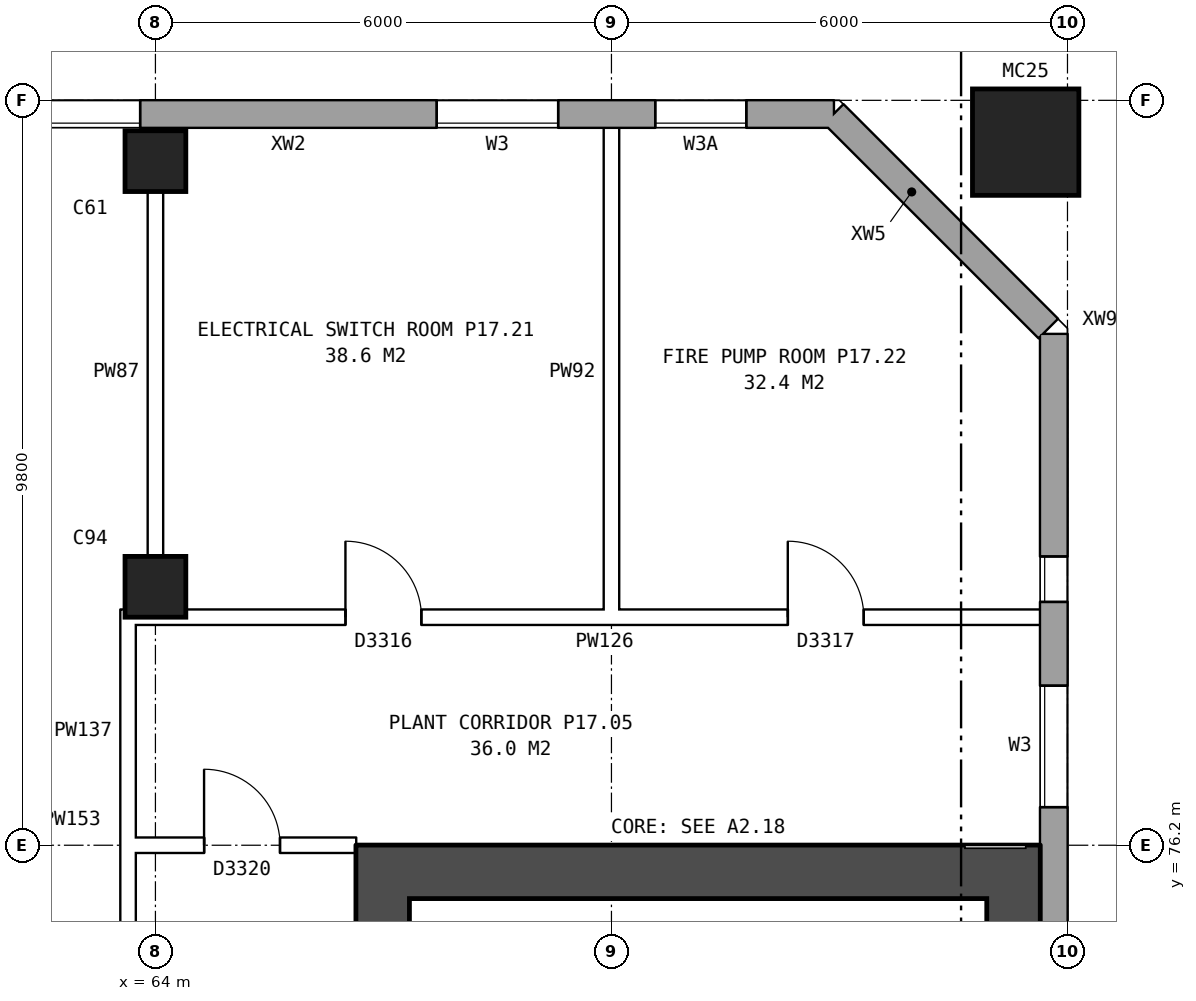
"""IFC4 building model, lengths in metres.
Left out: names, types, materials, properties, quantities, classifications, styles, units other than length and angle.
Written with IfcOpenShell. Run it as: python <this file> out.ifc"""

import sys

from ifc_helpers import new_model, si_unit, direction, frame, frame_2d, origin, origin_2d, place, context, subcontext, project, spatial, rectangle, hollow_rectangle, extrude, element, fill, save


model = new_model("IFC4")
c1 = context("Model", 3, precision=1e-05, world=origin(), true_north=direction((0.0, 1.0)))
c2 = subcontext(c1, "Body", "Model", "MODEL_VIEW")
j1 = project(units=[si_unit("LENGTHUNIT", "METRE"), si_unit("PLANEANGLEUNIT", "RADIAN")], contexts=[c1])
p1 = place(None, origin())
s1 = spatial("IfcSite", under=j1, at=p1, CompositionType="ELEMENT")
p2 = place(p1, origin())
s2 = spatial("IfcBuilding", under=s1, at=p2, CompositionType="ELEMENT")
p3 = place(p2, frame((0.0, 0.0, 62.9)))
s3 = spatial("IfcBuildingStorey", under=s2, at=p3, CompositionType="ELEMENT", Elevation=62.9)
for number, where, z_axis, x_axis in (
    (1, (64.0, 79.6, 0.0), (0.0, 0.0, 1.0), (1.0, 0.0, 0.0)),
    (2, (64.0, 85.2, 0.0), (0.0, 0.0, 1.0), (1.0, 0.0, 0.0)),
):
    element("IfcColumn", number, at=place(p3, frame(where, z_axis=z_axis, x_axis=x_axis)), inside=s3, PredefinedType="COLUMN", context=c2, shape_type="SweptSolid", body=[
        extrude(rectangle(XDim=0.8, YDim=0.8, at=origin_2d()), origin(), (0.0, 0.0, 1.0), 4.2),
    ])
p4 = place(p3, frame((75.45, 85.45, 0.0), z_axis=(0.0, 0.0, 1.0), x_axis=(1.0, 0.0, 0.0)))
e3 = element("IfcColumn", 3, at=p4, inside=s3, PredefinedType="COLUMN", context=c2, shape_type="SweptSolid", body=[
    extrude(hollow_rectangle(XDim=1.4, YDim=1.4, WallThickness=0.075, at=origin_2d()), origin(), (0.0, 0.0, 1.0), 4.5),
])
p5 = place(p3, frame((75.82, 57.075, 0.0), z_axis=(0.0, 0.0, 1.0), x_axis=(0.0, 1.0, 0.0)))
e4 = element("IfcWall", 4, at=p5, inside=s3, PredefinedType="STANDARD", context=c2, shape_type="SweptSolid", body=[
    extrude(rectangle(XDim=25.851, YDim=0.36, at=frame_2d((12.925, 0.0))), origin(), (0.0, 0.0, 1.0), 4.2),
])
p6 = place(p5, frame((2.9, 0.0, 1.5)))
e5 = element("IfcOpeningElement", 5, at=p6, cuts=e4, PredefinedType="OPENING", context=c2, shape_type="SweptSolid", body=[
    extrude(rectangle(XDim=0.6, YDim=1.2, at=frame_2d((0.3, 0.6))), frame((0.0, 0.19, 0.0), z_axis=(0.0, -1.0, 0.0), x_axis=(1.0, 0.0, 0.0)), (0.0, 0.0, 1.0), 0.38),
])
p7 = place(p5, frame((3.925, 0.0, 1.5)))
e6 = element("IfcOpeningElement", 6, at=p7, cuts=e4, PredefinedType="OPENING", context=c2, shape_type="SweptSolid", body=[
    extrude(rectangle(XDim=0.6, YDim=1.2, at=frame_2d((0.3, 0.6))), frame((0.0, 0.19, 0.0), z_axis=(0.0, -1.0, 0.0), x_axis=(1.0, 0.0, 0.0)), (0.0, 0.0, 1.0), 0.38),
])
p8 = place(p5, frame((19.625, 0.0, 1.5)))
e7 = element("IfcOpeningElement", 7, at=p8, cuts=e4, PredefinedType="OPENING", context=c2, shape_type="SweptSolid", body=[
    extrude(rectangle(XDim=1.6, YDim=1.2, at=frame_2d((0.8, 0.6))), frame((0.0, 0.19, 0.0), z_axis=(0.0, -1.0, 0.0), x_axis=(1.0, 0.0, 0.0)), (0.0, 0.0, 1.0), 0.38),
])
p9 = place(p5, frame((22.325, 0.0, 1.5)))
e8 = element("IfcOpeningElement", 8, at=p9, cuts=e4, PredefinedType="OPENING", context=c2, shape_type="SweptSolid", body=[
    extrude(rectangle(XDim=0.6, YDim=1.2, at=frame_2d((0.3, 0.6))), frame((0.0, 0.19, 0.0), z_axis=(0.0, -1.0, 0.0), x_axis=(1.0, 0.0, 0.0)), (0.0, 0.0, 1.0), 0.38),
])
p10 = place(p3, frame((75.746, 82.999, 0.953), z_axis=(0.0, 0.0, 1.0), x_axis=(-0.706994764273, 0.707218780358, 0.0)))
e9 = element("IfcWall", 9, at=p10, inside=s3, PredefinedType="STANDARD", context=c2, shape_type="SweptSolid", body=[
    extrude(rectangle(XDim=1.09, YDim=0.36, at=frame_2d((0.545, 0.0))), origin(), (0.0, 0.0, 1.0), 2.444),
])
p11 = place(p3, frame((74.976, 83.77, 0.0), z_axis=(0.0, 0.0, 1.0), x_axis=(-0.707148882153, 0.707064677713, 0.0)))
e10 = element("IfcWall", 10, at=p11, inside=s3, PredefinedType="STANDARD", context=c2, shape_type="SweptSolid", body=[
    extrude(rectangle(XDim=2.899, YDim=0.36, at=frame_2d((1.45, 0.0))), origin(), (0.0, 0.0, 1.0), 4.2),
])
p12 = place(p3, frame((72.925, 85.82, 0.0), z_axis=(0.0, 0.0, 1.0), x_axis=(-1.0, 0.0, 0.0)))
e11 = element("IfcWall", 11, at=p12, inside=s3, PredefinedType="STANDARD", context=c2, shape_type="SweptSolid", body=[
    extrude(rectangle(XDim=46.601, YDim=0.36, at=frame_2d((23.3, 0.0))), origin(), (0.0, 0.0, 1.0), 4.2),
])
p13 = place(p12, frame((1.15, 0.0, 1.5)))
e12 = element("IfcOpeningElement", 12, at=p13, cuts=e11, PredefinedType="OPENING", context=c2, shape_type="SweptSolid", body=[
    extrude(rectangle(XDim=1.2, YDim=1.2, at=frame_2d((0.6, 0.6))), frame((0.0, 0.19, 0.0), z_axis=(0.0, -1.0, 0.0), x_axis=(1.0, 0.0, 0.0)), (0.0, 0.0, 1.0), 0.38),
])
p14 = place(p12, frame((3.625, 0.0, 1.5)))
e13 = element("IfcOpeningElement", 13, at=p14, cuts=e11, PredefinedType="OPENING", context=c2, shape_type="SweptSolid", body=[
    extrude(rectangle(XDim=1.6, YDim=1.2, at=frame_2d((0.8, 0.6))), frame((0.0, 0.19, 0.0), z_axis=(0.0, -1.0, 0.0), x_axis=(1.0, 0.0, 0.0)), (0.0, 0.0, 1.0), 0.38),
])
p15 = place(p12, frame((9.125, 0.0, 1.5)))
e14 = element("IfcOpeningElement", 14, at=p15, cuts=e11, PredefinedType="OPENING", context=c2, shape_type="SweptSolid", body=[
    extrude(rectangle(XDim=1.2, YDim=1.2, at=frame_2d((0.6, 0.6))), frame((0.0, 0.19, 0.0), z_axis=(0.0, -1.0, 0.0), x_axis=(1.0, 0.0, 0.0)), (0.0, 0.0, 1.0), 0.38),
])
p16 = place(p12, frame((12.625, 0.0, 1.5)))
e15 = element("IfcOpeningElement", 15, at=p16, cuts=e11, PredefinedType="OPENING", context=c2, shape_type="SweptSolid", body=[
    extrude(rectangle(XDim=1.6, YDim=1.2, at=frame_2d((0.8, 0.6))), frame((0.0, 0.19, 0.0), z_axis=(0.0, -1.0, 0.0), x_axis=(1.0, 0.0, 0.0)), (0.0, 0.0, 1.0), 0.38),
])
p17 = place(p12, frame((15.625, 0.0, 1.5)))
e16 = element("IfcOpeningElement", 16, at=p17, cuts=e11, PredefinedType="OPENING", context=c2, shape_type="SweptSolid", body=[
    extrude(rectangle(XDim=1.6, YDim=1.2, at=frame_2d((0.8, 0.6))), frame((0.0, 0.19, 0.0), z_axis=(0.0, -1.0, 0.0), x_axis=(1.0, 0.0, 0.0)), (0.0, 0.0, 1.0), 0.38),
])
p18 = place(p12, frame((20.175, 0.0, 1.5)))
e17 = element("IfcOpeningElement", 17, at=p18, cuts=e11, PredefinedType="OPENING", context=c2, shape_type="SweptSolid", body=[
    extrude(rectangle(XDim=1.6, YDim=1.2, at=frame_2d((0.8, 0.6))), frame((0.0, 0.19, 0.0), z_axis=(0.0, -1.0, 0.0), x_axis=(1.0, 0.0, 0.0)), (0.0, 0.0, 1.0), 0.38),
])
p19 = place(p12, frame((24.625, 0.0, 1.5)))
e18 = element("IfcOpeningElement", 18, at=p19, cuts=e11, PredefinedType="OPENING", context=c2, shape_type="SweptSolid", body=[
    extrude(rectangle(XDim=1.6, YDim=1.2, at=frame_2d((0.8, 0.6))), frame((0.0, 0.19, 0.0), z_axis=(0.0, -1.0, 0.0), x_axis=(1.0, 0.0, 0.0)), (0.0, 0.0, 1.0), 0.38),
])
p20 = place(p12, frame((27.625, 0.0, 1.5)))
e19 = element("IfcOpeningElement", 19, at=p20, cuts=e11, PredefinedType="OPENING", context=c2, shape_type="SweptSolid", body=[
    extrude(rectangle(XDim=1.6, YDim=1.2, at=frame_2d((0.8, 0.6))), frame((0.0, 0.19, 0.0), z_axis=(0.0, -1.0, 0.0), x_axis=(1.0, 0.0, 0.0)), (0.0, 0.0, 1.0), 0.38),
])
p21 = place(p12, frame((32.025, 0.0, 1.5)))
e20 = element("IfcOpeningElement", 20, at=p21, cuts=e11, PredefinedType="OPENING", context=c2, shape_type="SweptSolid", body=[
    extrude(rectangle(XDim=0.6, YDim=1.2, at=frame_2d((0.3, 0.6))), frame((0.0, 0.19, 0.0), z_axis=(0.0, -1.0, 0.0), x_axis=(1.0, 0.0, 0.0)), (0.0, 0.0, 1.0), 0.38),
])
p22 = place(p12, frame((33.125, 0.0, 1.5)))
e21 = element("IfcOpeningElement", 21, at=p22, cuts=e11, PredefinedType="OPENING", context=c2, shape_type="SweptSolid", body=[
    extrude(rectangle(XDim=0.9, YDim=1.2, at=frame_2d((0.45, 0.6))), frame((0.0, 0.19, 0.0), z_axis=(0.0, -1.0, 0.0), x_axis=(1.0, 0.0, 0.0)), (0.0, 0.0, 1.0), 0.38),
])
p23 = place(p12, frame((36.625, 0.0, 1.5)))
e22 = element("IfcOpeningElement", 22, at=p23, cuts=e11, PredefinedType="OPENING", context=c2, shape_type="SweptSolid", body=[
    extrude(rectangle(XDim=1.6, YDim=1.2, at=frame_2d((0.8, 0.6))), frame((0.0, 0.19, 0.0), z_axis=(0.0, -1.0, 0.0), x_axis=(1.0, 0.0, 0.0)), (0.0, 0.0, 1.0), 0.38),
])
p24 = place(p12, frame((39.625, 0.0, 1.5)))
e23 = element("IfcOpeningElement", 23, at=p24, cuts=e11, PredefinedType="OPENING", context=c2, shape_type="SweptSolid", body=[
    extrude(rectangle(XDim=1.6, YDim=1.2, at=frame_2d((0.8, 0.6))), frame((0.0, 0.19, 0.0), z_axis=(0.0, -1.0, 0.0), x_axis=(1.0, 0.0, 0.0)), (0.0, 0.0, 1.0), 0.38),
])
p25 = place(p12, frame((43.925, 0.0, 1.5)))
e24 = element("IfcOpeningElement", 24, at=p25, cuts=e11, PredefinedType="OPENING", context=c2, shape_type="SweptSolid", body=[
    extrude(rectangle(XDim=0.6, YDim=1.2, at=frame_2d((0.3, 0.6))), frame((0.0, 0.19, 0.0), z_axis=(0.0, -1.0, 0.0), x_axis=(1.0, 0.0, 0.0)), (0.0, 0.0, 1.0), 0.38),
])
p26 = place(p3, frame((66.99, 64.5, 0.0), z_axis=(0.0, 0.0, 1.0), x_axis=(0.0, 1.0, 0.0)))
e25 = element("IfcWall", 25, at=p26, inside=s3, PredefinedType="SHEAR", context=c2, shape_type="SweptSolid", body=[
    extrude(rectangle(XDim=11.0, YDim=0.7, at=frame_2d((5.5, 0.0))), origin(), (0.0, 0.0, 1.0), 4.2),
])
p27 = place(p26, frame((0.625, 0.0, 0.0)))
e26 = element("IfcOpeningElement", 26, at=p27, cuts=e25, PredefinedType="OPENING", context=c2, shape_type="SweptSolid", body=[
    extrude(rectangle(XDim=1.1, YDim=2.1, at=frame_2d((0.55, 1.05))), frame((0.0, 0.36, 0.0), z_axis=(0.0, -1.0, 0.0), x_axis=(1.0, 0.0, 0.0)), (0.0, 0.0, 1.0), 0.72),
])
p28 = place(p26, frame((9.2, 0.0, 0.0)))
e27 = element("IfcOpeningElement", 27, at=p28, cuts=e25, PredefinedType="OPENING", context=c2, shape_type="SweptSolid", body=[
    extrude(rectangle(XDim=1.1, YDim=2.1, at=frame_2d((0.55, 1.05))), frame((0.0, 0.36, 0.0), z_axis=(0.0, -1.0, 0.0), x_axis=(1.0, 0.0, 0.0)), (0.0, 0.0, 1.0), 0.72),
])
p29 = place(p3, frame((75.29, 64.5, 0.0), z_axis=(0.0, 0.0, 1.0), x_axis=(0.0, 1.0, 0.0)))
e28 = element("IfcWall", 28, at=p29, inside=s3, PredefinedType="SHEAR", context=c2, shape_type="SweptSolid", body=[
    extrude(rectangle(XDim=11.0, YDim=0.7, at=frame_2d((5.5, 0.0))), origin(), (0.0, 0.0, 1.0), 4.2),
])
p30 = place(p3, frame((66.64, 75.85, 0.0), z_axis=(0.0, 0.0, 1.0), x_axis=(1.0, 0.0, 0.0)))
e29 = element("IfcWall", 29, at=p30, inside=s3, PredefinedType="SHEAR", context=c2, shape_type="SweptSolid", body=[
    extrude(rectangle(XDim=9.0, YDim=0.7, at=frame_2d((4.5, 0.0))), origin(), (0.0, 0.0, 1.0), 4.2),
])
p31 = place(p3, frame((63.64, 63.9, 0.0), z_axis=(0.0, 0.0, 1.0), x_axis=(0.0, 1.0, 0.0)))
e30 = element("IfcWall", 30, at=p31, inside=s3, PredefinedType="PARTITIONING", context=c2, shape_type="SweptSolid", body=[
    extrude(rectangle(XDim=12.2, YDim=0.2, at=frame_2d((6.1, 0.0))), origin(), (0.0, 0.0, 1.0), 4.2),
])
p32 = place(p31, frame((5.1, 0.0, 0.0)))
e31 = element("IfcOpeningElement", 31, at=p32, cuts=e30, PredefinedType="OPENING", context=c2, shape_type="SweptSolid", body=[
    extrude(rectangle(XDim=2.0, YDim=2.1, at=frame_2d((1.0, 1.05))), frame((0.0, 0.11, 0.0), z_axis=(0.0, -1.0, 0.0), x_axis=(1.0, 0.0, 0.0)), (0.0, 0.0, 1.0), 0.22),
])
p33 = place(p3, frame((63.54, 76.2, 0.0), z_axis=(0.0, 0.0, 1.0), x_axis=(1.0, 0.0, 0.0)))
e32 = element("IfcWall", 32, at=p33, inside=s3, PredefinedType="PARTITIONING", context=c2, shape_type="SweptSolid", body=[
    extrude(rectangle(XDim=3.1, YDim=0.2, at=frame_2d((1.55, 0.0))), origin(), (0.0, 0.0, 1.0), 4.2),
])
p34 = place(p33, frame((1.1, 0.0, 0.0)))
e33 = element("IfcOpeningElement", 33, at=p34, cuts=e32, PredefinedType="OPENING", context=c2, shape_type="SweptSolid", body=[
    extrude(rectangle(XDim=1.0, YDim=2.1, at=frame_2d((0.5, 1.05))), frame((0.0, 0.11, 0.0), z_axis=(0.0, -1.0, 0.0), x_axis=(1.0, 0.0, 0.0)), (0.0, 0.0, 1.0), 0.22),
])
p35 = place(p3, frame((63.54, 79.2, 0.0), z_axis=(0.0, 0.0, 1.0), x_axis=(1.0, 0.0, 0.0)))
e34 = element("IfcWall", 34, at=p35, inside=s3, PredefinedType="PARTITIONING", context=c2, shape_type="SweptSolid", body=[
    extrude(rectangle(XDim=12.22, YDim=0.2, at=frame_2d((6.11, 0.0))), origin(), (0.0, 0.0, 1.0), 4.2),
])
p36 = place(p35, frame((2.96, 0.0, 0.0)))
e35 = element("IfcOpeningElement", 35, at=p36, cuts=e34, PredefinedType="OPENING", context=c2, shape_type="SweptSolid", body=[
    extrude(rectangle(XDim=1.0, YDim=2.1, at=frame_2d((0.5, 1.05))), frame((0.0, 0.11, 0.0), z_axis=(0.0, -1.0, 0.0), x_axis=(1.0, 0.0, 0.0)), (0.0, 0.0, 1.0), 0.22),
])
p37 = place(p35, frame((8.78, 0.0, 0.0)))
e36 = element("IfcOpeningElement", 36, at=p37, cuts=e34, PredefinedType="OPENING", context=c2, shape_type="SweptSolid", body=[
    extrude(rectangle(XDim=1.0, YDim=2.1, at=frame_2d((0.5, 1.05))), frame((0.0, 0.11, 0.0), z_axis=(0.0, -1.0, 0.0), x_axis=(1.0, 0.0, 0.0)), (0.0, 0.0, 1.0), 0.22),
])
p38 = place(p3, frame((63.64, 76.1, 0.0), z_axis=(0.0, 0.0, 1.0), x_axis=(0.0, 1.0, 0.0)))
e37 = element("IfcWall", 37, at=p38, inside=s3, PredefinedType="PARTITIONING", context=c2, shape_type="SweptSolid", body=[
    extrude(rectangle(XDim=3.2, YDim=0.2, at=frame_2d((1.6, 0.0))), origin(), (0.0, 0.0, 1.0), 4.2),
])
for number, where, z_axis, x_axis in (
    (38, (64.0, 79.1, 0.0), (0.0, 0.0, 1.0), (0.0, 1.0, 0.0)),
    (39, (70.0, 79.1, 0.0), (0.0, 0.0, 1.0), (0.0, 1.0, 0.0)),
):
    element("IfcWall", number, at=place(p3, frame(where, z_axis=z_axis, x_axis=x_axis)), inside=s3, PredefinedType="PARTITIONING", context=c2, shape_type="SweptSolid", body=[
        extrude(rectangle(XDim=6.66, YDim=0.2, at=frame_2d((3.33, 0.0))), origin(), (0.0, 0.0, 1.0), 4.2),
    ])
p39 = place(p8, origin())
e40 = element("IfcWindow", 40, at=p39, inside=s3, PartitioningType="DOUBLE_PANEL_HORIZONTAL", PredefinedType="WINDOW", context=c2, shape_type="SweptSolid", body=[
    extrude(rectangle(XDim=1.6, YDim=1.2, at=frame_2d((0.8, 0.6))), frame((0.0, 0.15, 0.0), z_axis=(0.0, -1.0, 0.0), x_axis=(1.0, 0.0, 0.0)), (0.0, 0.0, 1.0), 0.06),
])
fill(e7, e40)
p40 = place(p9, origin())
e41 = element("IfcWindow", 41, at=p40, inside=s3, PartitioningType="DOUBLE_PANEL_HORIZONTAL", PredefinedType="WINDOW", context=c2, shape_type="SweptSolid", body=[
    extrude(rectangle(XDim=0.6, YDim=1.2, at=frame_2d((0.3, 0.6))), frame((0.0, 0.15, 0.0), z_axis=(0.0, -1.0, 0.0), x_axis=(1.0, 0.0, 0.0)), (0.0, 0.0, 1.0), 0.06),
])
fill(e8, e41)
p41 = place(p13, origin())
e42 = element("IfcWindow", 42, at=p41, inside=s3, PartitioningType="DOUBLE_PANEL_HORIZONTAL", PredefinedType="WINDOW", context=c2, shape_type="SweptSolid", body=[
    extrude(rectangle(XDim=1.2, YDim=1.2, at=frame_2d((0.6, 0.6))), frame((0.0, 0.15, 0.0), z_axis=(0.0, -1.0, 0.0), x_axis=(1.0, 0.0, 0.0)), (0.0, 0.0, 1.0), 0.06),
])
fill(e12, e42)
p42 = place(p14, origin())
e43 = element("IfcWindow", 43, at=p42, inside=s3, PartitioningType="DOUBLE_PANEL_HORIZONTAL", PredefinedType="WINDOW", context=c2, shape_type="SweptSolid", body=[
    extrude(rectangle(XDim=1.6, YDim=1.2, at=frame_2d((0.8, 0.6))), frame((0.0, 0.15, 0.0), z_axis=(0.0, -1.0, 0.0), x_axis=(1.0, 0.0, 0.0)), (0.0, 0.0, 1.0), 0.06),
])
fill(e13, e43)
p43 = place(p15, origin())
e44 = element("IfcWindow", 44, at=p43, inside=s3, PartitioningType="DOUBLE_PANEL_HORIZONTAL", PredefinedType="WINDOW", context=c2, shape_type="SweptSolid", body=[
    extrude(rectangle(XDim=1.2, YDim=1.2, at=frame_2d((0.6, 0.6))), frame((0.0, 0.15, 0.0), z_axis=(0.0, -1.0, 0.0), x_axis=(1.0, 0.0, 0.0)), (0.0, 0.0, 1.0), 0.06),
])
fill(e14, e44)
p44 = place(p34, origin())
e45 = element("IfcDoor", 45, at=p44, inside=s3, OperationType="SINGLE_SWING_LEFT", PredefinedType="DOOR", context=c2, shape_type="SweptSolid", body=[
    extrude(rectangle(XDim=1.0, YDim=2.1, at=frame_2d((0.5, 1.05))), frame((0.0, 0.025, 0.0), z_axis=(0.0, -1.0, 0.0), x_axis=(1.0, 0.0, 0.0)), (0.0, 0.0, 1.0), 0.05),
])
fill(e33, e45)
p45 = place(p36, origin())
e46 = element("IfcDoor", 46, at=p45, inside=s3, OperationType="SINGLE_SWING_LEFT", PredefinedType="DOOR", context=c2, shape_type="SweptSolid", body=[
    extrude(rectangle(XDim=1.0, YDim=2.1, at=frame_2d((0.5, 1.05))), frame((0.0, 0.025, 0.0), z_axis=(0.0, -1.0, 0.0), x_axis=(1.0, 0.0, 0.0)), (0.0, 0.0, 1.0), 0.05),
])
fill(e35, e46)
p46 = place(p37, origin())
e47 = element("IfcDoor", 47, at=p46, inside=s3, OperationType="SINGLE_SWING_LEFT", PredefinedType="DOOR", context=c2, shape_type="SweptSolid", body=[
    extrude(rectangle(XDim=1.0, YDim=2.1, at=frame_2d((0.5, 1.05))), frame((0.0, 0.025, 0.0), z_axis=(0.0, -1.0, 0.0), x_axis=(1.0, 0.0, 0.0)), (0.0, 0.0, 1.0), 0.05),
])
fill(e36, e47)
save(model, sys.argv[1])
